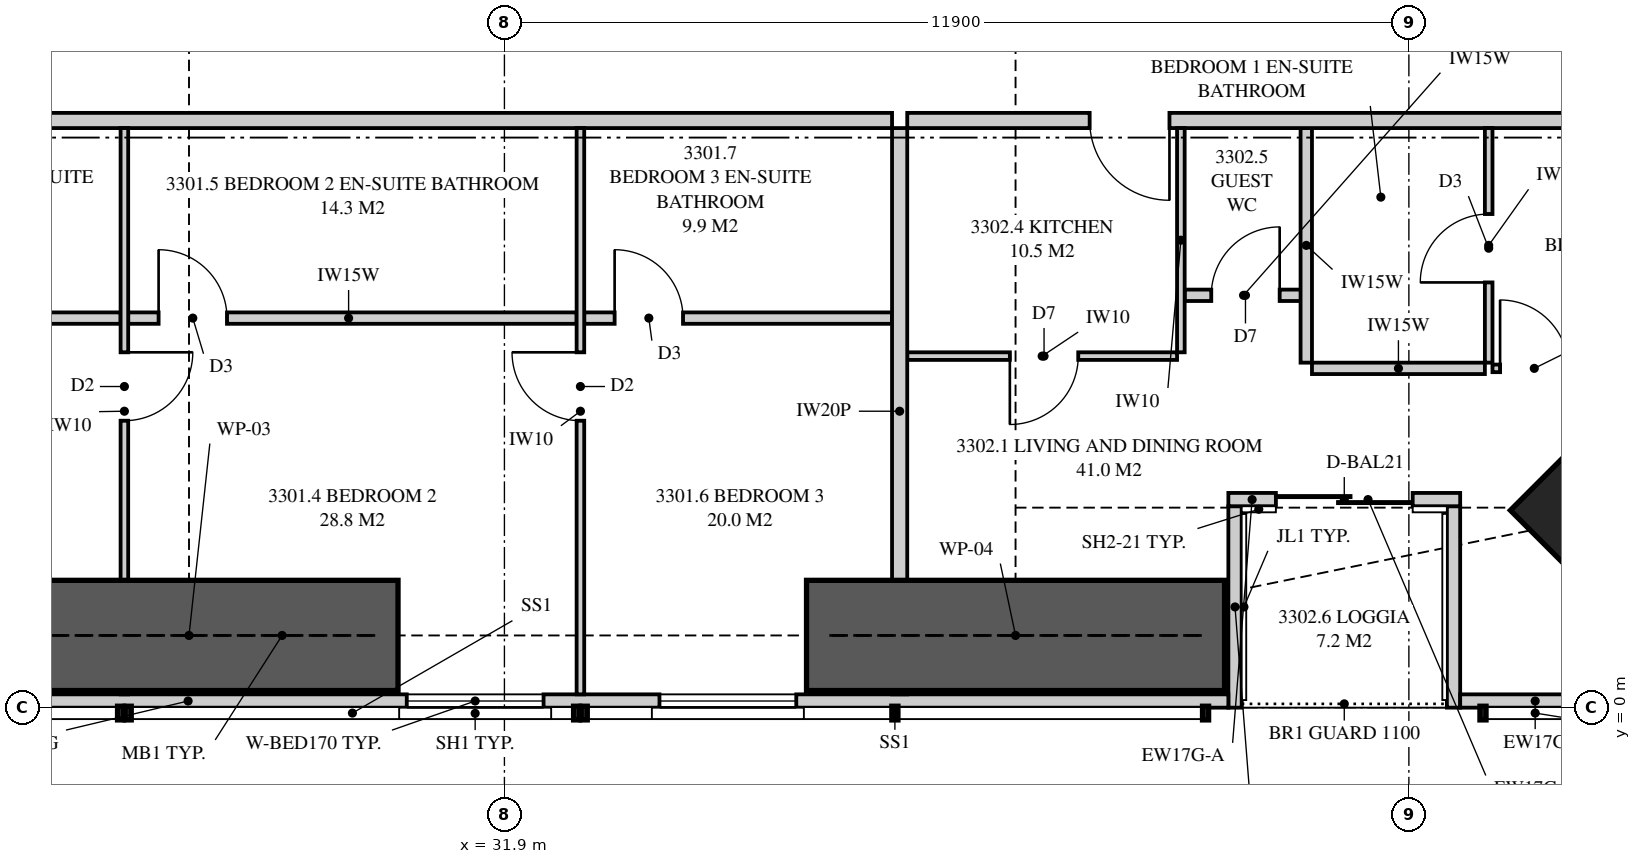
"""IFC4 building model, lengths in metres.
Left out: names, types, materials, properties, quantities, classifications, styles, units other than length and angle.
Written with IfcOpenShell. Run it as: python <this file> out.ifc"""

import sys

from ifc_helpers import new_model, si_unit, direction, frame, frame_2d, origin, origin_2d, place, context, subcontext, project, spatial, polyline, rectangle, outline, extrude, element, fill, save


model = new_model("IFC4")
c1 = context("Model", 3, precision=1e-05, world=origin(), true_north=direction((0.0, 1.0)))
c2 = subcontext(c1, "Body", "Model", "MODEL_VIEW")
j1 = project(units=[si_unit("LENGTHUNIT", "METRE"), si_unit("PLANEANGLEUNIT", "RADIAN")], contexts=[c1])
p1 = place(None, origin())
s1 = spatial("IfcSite", under=j1, at=p1, CompositionType="ELEMENT")
p2 = place(p1, origin())
s2 = spatial("IfcBuilding", under=s1, at=p2, CompositionType="ELEMENT")
p3 = place(p2, frame((0.0, 0.0, 121.6)))
s3 = spatial("IfcBuildingStorey", under=s2, at=p3, CompositionType="ELEMENT", Elevation=121.6)
p4 = place(p3, frame((46.869, 2.631, 0.0), z_axis=(0.0, 0.0, 1.0), x_axis=(-0.707106781187, 0.707106781187, 0.0)))
e1 = element("IfcColumn", 1, at=p4, inside=s3, PredefinedType="COLUMN", context=c2, shape_type="SweptSolid", body=[
    extrude(rectangle(XDim=2.4, YDim=2.5, at=origin_2d()), origin(), (0.0, 0.0, 1.0), 3.35),
])
p5 = place(p3, frame((14.051, 0.087, 0.0), z_axis=(0.0, 0.0, 1.0), x_axis=(1.0, 0.0, 0.0)))
e2 = element("IfcWall", 2, at=p5, inside=s3, PredefinedType="SOLIDWALL", context=c2, shape_type="SweptSolid", body=[
    extrude(outline(polyline([(0.0, 0.0), (27.374, 0.0), (27.374, 3.11), (24.777, 3.11), (24.777, 2.15), (24.732, 2.15), (24.732, 3.11), (24.574, 3.11), (24.574, 2.15), (2.824, 2.15), (2.824, 3.11), (2.666, 3.11), (2.666, 2.15), (2.62, 2.15), (2.62, 3.11), (0.0, 3.11), (0.0, 0.0)])), frame((0.0, 0.087, 0.0), z_axis=(0.0, -1.0, 0.0), x_axis=(1.0, 0.0, 0.0)), (0.0, 0.0, 1.0), 0.175),
])
p6 = place(p5, frame((5.874, 0.0, 0.4)))
e3 = element("IfcOpeningElement", 3, at=p6, cuts=e2, PredefinedType="OPENING", context=c2, shape_type="SweptSolid", body=[
    extrude(rectangle(XDim=1.8, YDim=1.7, at=frame_2d((0.9, 0.85))), frame((0.0, 0.097, 0.0), z_axis=(0.0, -1.0, 0.0), x_axis=(1.0, 0.0, 0.0)), (0.0, 0.0, 1.0), 0.195),
])
p7 = place(p5, frame((9.04, 0.0, 0.4)))
e4 = element("IfcOpeningElement", 4, at=p7, cuts=e2, PredefinedType="OPENING", context=c2, shape_type="SweptSolid", body=[
    extrude(rectangle(XDim=1.8, YDim=1.7, at=frame_2d((0.9, 0.85))), frame((0.0, 0.097, 0.0), z_axis=(0.0, -1.0, 0.0), x_axis=(1.0, 0.0, 0.0)), (0.0, 0.0, 1.0), 0.195),
])
p8 = place(p5, frame((16.564, 0.0, 0.4)))
e5 = element("IfcOpeningElement", 5, at=p8, cuts=e2, PredefinedType="OPENING", context=c2, shape_type="SweptSolid", body=[
    extrude(rectangle(XDim=1.8, YDim=1.7, at=frame_2d((0.9, 0.85))), frame((0.0, 0.097, 0.0), z_axis=(0.0, -1.0, 0.0), x_axis=(1.0, 0.0, 0.0)), (0.0, 0.0, 1.0), 0.195),
])
p9 = place(p5, frame((19.889, 0.0, 0.4)))
e6 = element("IfcOpeningElement", 6, at=p9, cuts=e2, PredefinedType="OPENING", context=c2, shape_type="SweptSolid", body=[
    extrude(rectangle(XDim=1.8, YDim=1.7, at=frame_2d((0.9, 0.85))), frame((0.0, 0.097, 0.0), z_axis=(0.0, -1.0, 0.0), x_axis=(1.0, 0.0, 0.0)), (0.0, 0.0, 1.0), 0.195),
])
p10 = place(p3, frame((44.475, 0.087, 0.0), z_axis=(0.0, 0.0, 1.0), x_axis=(1.0, 0.0, 0.0)))
e7 = element("IfcWall", 7, at=p10, inside=s3, PredefinedType="SOLIDWALL", context=c2, shape_type="SweptSolid", body=[
    extrude(rectangle(XDim=1.974, YDim=0.175, at=frame_2d((0.987, 0.0))), origin(), (0.0, 0.0, 1.0), 3.11),
])
p11 = place(p3, frame((41.425, 2.738, 0.0), z_axis=(0.0, 0.0, 1.0), x_axis=(1.0, 0.0, 0.0)))
e8 = element("IfcWall", 8, at=p11, inside=s3, PredefinedType="SOLIDWALL", context=c2, shape_type="SweptSolid", body=[
    extrude(rectangle(XDim=0.625, YDim=0.175, at=frame_2d((0.312, 0.0))), origin(), (0.0, 0.0, 1.0), 2.51),
])
p12 = place(p3, frame((42.05, 2.738, 0.0), z_axis=(0.0, 0.0, 1.0), x_axis=(1.0, 0.0, 0.0)))
e9 = element("IfcWall", 9, at=p12, inside=s3, PredefinedType="SOLIDWALL", context=c2, shape_type="SweptSolid", body=[
    extrude(rectangle(XDim=2.425, YDim=0.175, at=frame_2d((1.212, 0.0))), origin(), (0.0, 0.0, 1.0), 2.15),
])
p13 = place(p12, origin())
e10 = element("IfcOpeningElement", 10, at=p13, cuts=e9, PredefinedType="OPENING", context=c2, shape_type="SweptSolid", body=[
    extrude(rectangle(XDim=1.8, YDim=2.1, at=frame_2d((0.9, 1.05))), frame((0.0, 0.097, 0.0), z_axis=(0.0, -1.0, 0.0), x_axis=(1.0, 0.0, 0.0)), (0.0, 0.0, 1.0), 0.195),
])
p14 = place(p3, frame((41.512, 0.0, 0.0), z_axis=(0.0, 0.0, 1.0), x_axis=(0.0, 1.0, 0.0)))
e11 = element("IfcWall", 11, at=p14, inside=s3, PredefinedType="SOLIDWALL", context=c2, shape_type="SweptSolid", body=[
    extrude(outline(polyline([(0.0, 0.0), (2.65, 0.0), (2.65, 2.51), (2.373, 2.51), (2.373, 2.15), (0.705, 2.15), (0.705, 3.11), (0.0, 3.11), (0.0, 0.0)])), frame((0.0, 0.087, 0.0), z_axis=(0.0, -1.0, 0.0), x_axis=(1.0, 0.0, 0.0)), (0.0, 0.0, 1.0), 0.175),
])
p15 = place(p3, frame((44.387, 0.0, 0.0), z_axis=(0.0, 0.0, 1.0), x_axis=(0.0, 1.0, 0.0)))
e12 = element("IfcWall", 12, at=p15, inside=s3, PredefinedType="SOLIDWALL", context=c2, shape_type="SweptSolid", body=[
    extrude(outline(polyline([(0.0, 0.0), (2.65, 0.0), (2.65, 2.15), (1.291, 2.15), (1.291, 3.11), (0.0, 3.11), (0.0, 0.0)])), frame((0.0, 0.087, 0.0), z_axis=(0.0, -1.0, 0.0), x_axis=(1.0, 0.0, 0.0)), (0.0, 0.0, 1.0), 0.175),
])
p16 = place(p3, frame((37.1, 0.175, 0.0), z_axis=(0.0, 0.0, 1.0), x_axis=(0.0, 1.0, 0.0)))
e13 = element("IfcWall", 13, at=p16, inside=s3, PredefinedType="PARTITIONING", context=c2, shape_type="SweptSolid", body=[
    extrude(outline(polyline([(0.529, 2.15), (0.0, 2.15), (0.0, 0.0), (0.529, 0.0), (0.529, 0.461), (1.021, 0.461), (1.021, 0.0), (7.45, 0.0), (7.45, 3.11), (1.685, 3.11), (1.685, 2.15), (1.021, 2.15), (1.021, 1.688), (0.529, 1.688), (0.529, 2.15)])), frame((0.0, 0.1, 0.0), z_axis=(0.0, -1.0, 0.0), x_axis=(1.0, 0.0, 0.0)), (0.0, 0.0, 1.0), 0.2),
])
p17 = place(p3, frame((17.775, 7.725, 0.0), z_axis=(0.0, 0.0, 1.0), x_axis=(1.0, 0.0, 0.0)))
e14 = element("IfcWall", 14, at=p17, inside=s3, PredefinedType="PARTITIONING", context=c2, shape_type="SweptSolid", body=[
    extrude(outline(polyline([(0.0, 0.0), (19.225, 0.0), (19.225, 3.11), (10.312, 3.11), (10.312, 2.541), (9.638, 2.541), (9.638, 3.11), (0.0, 3.11), (0.0, 0.0)])), frame((0.0, 0.1, 0.0), z_axis=(0.0, -1.0, 0.0), x_axis=(1.0, 0.0, 0.0)), (0.0, 0.0, 1.0), 0.2),
])
p18 = place(p17, frame((3.275, 0.0, 0.0)))
e15 = element("IfcOpeningElement", 15, at=p18, cuts=e14, PredefinedType="OPENING", context=c2, shape_type="SweptSolid", body=[
    extrude(rectangle(XDim=1.05, YDim=2.2, at=frame_2d((0.525, 1.1))), frame((0.0, 0.11, 0.0), z_axis=(0.0, -1.0, 0.0), x_axis=(1.0, 0.0, 0.0)), (0.0, 0.0, 1.0), 0.22),
])
p19 = place(p3, frame((26.9, 0.175, 0.0), z_axis=(0.0, 0.0, 1.0), x_axis=(0.0, 1.0, 0.0)))
e16 = element("IfcWall", 16, at=p19, inside=s3, PredefinedType="PARTITIONING", context=c2, shape_type="SweptSolid", body=[
    extrude(outline(polyline([(0.529, 2.15), (0.0, 2.15), (0.0, 0.0), (0.529, 0.0), (0.529, 0.889), (1.021, 0.889), (1.021, 0.0), (7.45, 0.0), (7.45, 3.11), (1.635, 3.11), (1.635, 2.15), (1.021, 2.15), (1.021, 1.261), (0.529, 1.261), (0.529, 2.15)])), frame((0.0, 0.05, 0.0), z_axis=(0.0, -1.0, 0.0), x_axis=(1.0, 0.0, 0.0)), (0.0, 0.0, 1.0), 0.1),
])
p20 = place(p19, frame((3.6, 0.0, 0.0)))
e17 = element("IfcOpeningElement", 17, at=p20, cuts=e16, PredefinedType="OPENING", context=c2, shape_type="SweptSolid", body=[
    extrude(rectangle(XDim=0.9, YDim=2.1, at=frame_2d((0.45, 1.05))), frame((0.0, 0.06, 0.0), z_axis=(0.0, -1.0, 0.0), x_axis=(1.0, 0.0, 0.0)), (0.0, 0.0, 1.0), 0.12),
])
p21 = place(p3, frame((32.9, 0.175, 0.0), z_axis=(0.0, 0.0, 1.0), x_axis=(0.0, 1.0, 0.0)))
e18 = element("IfcWall", 18, at=p21, inside=s3, PredefinedType="PARTITIONING", context=c2, shape_type="SweptSolid", body=[
    extrude(outline(polyline([(0.0, 0.0), (7.45, 0.0), (7.45, 3.11), (1.635, 3.11), (1.635, 2.15), (0.0, 2.15), (0.0, 3.11), (0.0, 0.0)])), frame((0.0, 0.05, 0.0), z_axis=(0.0, -1.0, 0.0), x_axis=(1.0, 0.0, 0.0)), (0.0, 0.0, 1.0), 0.1),
])
p22 = place(p21, frame((3.6, 0.0, 0.0)))
e19 = element("IfcOpeningElement", 19, at=p22, cuts=e18, PredefinedType="OPENING", context=c2, shape_type="SweptSolid", body=[
    extrude(rectangle(XDim=0.9, YDim=2.1, at=frame_2d((0.45, 1.05))), frame((0.0, 0.06, 0.0), z_axis=(0.0, -1.0, 0.0), x_axis=(1.0, 0.0, 0.0)), (0.0, 0.0, 1.0), 0.12),
])
p23 = place(p3, frame((22.7, 5.125, 0.0), z_axis=(0.0, 0.0, 1.0), x_axis=(1.0, 0.0, 0.0)))
e20 = element("IfcWall", 20, at=p23, inside=s3, PredefinedType="PLUMBINGWALL", context=c2, shape_type="SweptSolid", body=[
    extrude(rectangle(XDim=4.15, YDim=0.15, at=frame_2d((2.075, 0.0))), origin(), (0.0, 0.0, 1.0), 3.11),
])
p24 = place(p23, frame((0.4, 0.0, 0.0)))
e21 = element("IfcOpeningElement", 21, at=p24, cuts=e20, PredefinedType="OPENING", context=c2, shape_type="SweptSolid", body=[
    extrude(rectangle(XDim=0.9, YDim=2.1, at=frame_2d((0.45, 1.05))), frame((0.0, 0.085, 0.0), z_axis=(0.0, -1.0, 0.0), x_axis=(1.0, 0.0, 0.0)), (0.0, 0.0, 1.0), 0.17),
])
p25 = place(p3, frame((26.95, 5.125, 0.0), z_axis=(0.0, 0.0, 1.0), x_axis=(1.0, 0.0, 0.0)))
e22 = element("IfcWall", 22, at=p25, inside=s3, PredefinedType="PLUMBINGWALL", context=c2, shape_type="SweptSolid", body=[
    extrude(outline(polyline([(0.0, 0.0), (5.9, 0.0), (5.9, 3.11), (1.112, 3.11), (1.112, 2.541), (0.488, 2.541), (0.488, 3.11), (0.0, 3.11), (0.0, 0.0)])), frame((0.0, 0.075, 0.0), z_axis=(0.0, -1.0, 0.0), x_axis=(1.0, 0.0, 0.0)), (0.0, 0.0, 1.0), 0.15),
])
p26 = place(p25, frame((0.4, 0.0, 0.0)))
e23 = element("IfcOpeningElement", 23, at=p26, cuts=e22, PredefinedType="OPENING", context=c2, shape_type="SweptSolid", body=[
    extrude(rectangle(XDim=0.9, YDim=2.1, at=frame_2d((0.45, 1.05))), frame((0.0, 0.085, 0.0), z_axis=(0.0, -1.0, 0.0), x_axis=(1.0, 0.0, 0.0)), (0.0, 0.0, 1.0), 0.17),
])
p27 = place(p3, frame((32.95, 5.125, 0.0), z_axis=(0.0, 0.0, 1.0), x_axis=(1.0, 0.0, 0.0)))
e24 = element("IfcWall", 24, at=p27, inside=s3, PredefinedType="PLUMBINGWALL", context=c2, shape_type="SweptSolid", body=[
    extrude(rectangle(XDim=4.05, YDim=0.15, at=frame_2d((2.025, 0.0))), origin(), (0.0, 0.0, 1.0), 3.11),
])
p28 = place(p27, frame((0.4, 0.0, 0.0)))
e25 = element("IfcOpeningElement", 25, at=p28, cuts=e24, PredefinedType="OPENING", context=c2, shape_type="SweptSolid", body=[
    extrude(rectangle(XDim=0.9, YDim=2.1, at=frame_2d((0.45, 1.05))), frame((0.0, 0.085, 0.0), z_axis=(0.0, -1.0, 0.0), x_axis=(1.0, 0.0, 0.0)), (0.0, 0.0, 1.0), 0.17),
])
p29 = place(p3, frame((37.2, 7.725, 0.0), z_axis=(0.0, 0.0, 1.0), x_axis=(1.0, 0.0, 0.0)))
e26 = element("IfcWall", 26, at=p29, inside=s3, PredefinedType="PARTITIONING", context=c2, shape_type="SweptSolid", body=[
    extrude(outline(polyline([(0.0, 0.0), (8.825, 0.0), (8.825, 3.11), (1.762, 3.11), (1.762, 2.541), (1.088, 2.541), (1.088, 3.11), (0.0, 3.11), (0.0, 0.0)])), frame((0.0, 0.1, 0.0), z_axis=(0.0, -1.0, 0.0), x_axis=(1.0, 0.0, 0.0)), (0.0, 0.0, 1.0), 0.2),
])
p30 = place(p29, frame((2.4, 0.0, 0.0)))
e27 = element("IfcOpeningElement", 27, at=p30, cuts=e26, PredefinedType="OPENING", context=c2, shape_type="SweptSolid", body=[
    extrude(rectangle(XDim=1.05, YDim=2.2, at=frame_2d((0.525, 1.1))), frame((0.0, 0.11, 0.0), z_axis=(0.0, -1.0, 0.0), x_axis=(1.0, 0.0, 0.0)), (0.0, 0.0, 1.0), 0.22),
])
p31 = place(p3, frame((44.85, 4.539, 0.0), z_axis=(0.0, 0.0, 1.0), x_axis=(0.0, 1.0, 0.0)))
e28 = element("IfcWall", 28, at=p31, inside=s3, PredefinedType="PARTITIONING", context=c2, shape_type="SweptSolid", body=[
    extrude(rectangle(XDim=3.086, YDim=0.1, at=frame_2d((1.543, 0.0))), origin(), (0.0, 0.0, 1.0), 3.11),
])
p32 = place(p31, frame((1.056, 0.0, 0.0)))
e29 = element("IfcOpeningElement", 29, at=p32, cuts=e28, PredefinedType="OPENING", context=c2, shape_type="SweptSolid", body=[
    extrude(rectangle(XDim=0.9, YDim=2.1, at=frame_2d((0.45, 1.05))), frame((0.0, 0.06, 0.0), z_axis=(0.0, -1.0, 0.0), x_axis=(1.0, 0.0, 0.0)), (0.0, 0.0, 1.0), 0.12),
])
p33 = place(p3, frame((44.9, 4.464, 0.0), z_axis=(0.0, 0.0, 1.0), x_axis=(1.0, 0.0, 0.0)))
e30 = element("IfcWall", 30, at=p33, inside=s3, PredefinedType="PARTITIONING", context=c2, shape_type="SweptSolid", body=[
    extrude(outline(polyline([(0.0, 0.0), (4.6, 0.0), (4.6, 3.11), (3.137, 3.11), (3.137, 2.15), (1.395, 2.15), (1.395, 3.11), (0.0, 3.11), (0.0, 0.0)])), frame((0.0, 0.05, 0.0), z_axis=(0.0, -1.0, 0.0), x_axis=(1.0, 0.0, 0.0)), (0.0, 0.0, 1.0), 0.1),
])
p34 = place(p33, frame((0.1, 0.0, 0.0)))
e31 = element("IfcOpeningElement", 31, at=p34, cuts=e30, PredefinedType="OPENING", context=c2, shape_type="SweptSolid", body=[
    extrude(rectangle(XDim=0.9, YDim=2.1, at=frame_2d((0.45, 1.05))), frame((0.0, 0.06, 0.0), z_axis=(0.0, -1.0, 0.0), x_axis=(1.0, 0.0, 0.0)), (0.0, 0.0, 1.0), 0.12),
])
p35 = place(p3, frame((42.525, 4.464, 0.0), z_axis=(0.0, 0.0, 1.0), x_axis=(1.0, 0.0, 0.0)))
e32 = element("IfcWall", 32, at=p35, inside=s3, PredefinedType="PLUMBINGWALL", context=c2, shape_type="SweptSolid", body=[
    extrude(rectangle(XDim=2.275, YDim=0.15, at=frame_2d((1.138, 0.0))), origin(), (0.0, 0.0, 1.0), 3.11),
])
p36 = place(p3, frame((42.45, 4.539, 0.0), z_axis=(0.0, 0.0, 1.0), x_axis=(0.0, 1.0, 0.0)))
e33 = element("IfcWall", 33, at=p36, inside=s3, PredefinedType="PLUMBINGWALL", context=c2, shape_type="SweptSolid", body=[
    extrude(rectangle(XDim=3.086, YDim=0.15, at=frame_2d((1.543, 0.0))), origin(), (0.0, 0.0, 1.0), 3.11),
])
p37 = place(p3, frame((37.2, 4.625, 0.0), z_axis=(0.0, 0.0, 1.0), x_axis=(1.0, 0.0, 0.0)))
e34 = element("IfcWall", 34, at=p37, inside=s3, PredefinedType="PARTITIONING", context=c2, shape_type="SweptSolid", body=[
    extrude(outline(polyline([(0.0, 0.0), (3.55, 0.0), (3.55, 3.11), (1.712, 3.11), (1.712, 2.541), (1.138, 2.541), (1.138, 3.11), (0.0, 3.11), (0.0, 0.0)])), frame((0.0, 0.05, 0.0), z_axis=(0.0, -1.0, 0.0), x_axis=(1.0, 0.0, 0.0)), (0.0, 0.0, 1.0), 0.1),
])
p38 = place(p37, frame((1.35, 0.0, 0.0)))
e35 = element("IfcOpeningElement", 35, at=p38, cuts=e34, PredefinedType="OPENING", context=c2, shape_type="SweptSolid", body=[
    extrude(rectangle(XDim=0.9, YDim=2.1, at=frame_2d((0.45, 1.05))), frame((0.0, 0.06, 0.0), z_axis=(0.0, -1.0, 0.0), x_axis=(1.0, 0.0, 0.0)), (0.0, 0.0, 1.0), 0.12),
])
p39 = place(p3, frame((40.8, 4.675, 0.0), z_axis=(0.0, 0.0, 1.0), x_axis=(0.0, 1.0, 0.0)))
e36 = element("IfcWall", 36, at=p39, inside=s3, PredefinedType="PARTITIONING", context=c2, shape_type="SweptSolid", body=[
    extrude(rectangle(XDim=2.95, YDim=0.1, at=frame_2d((1.475, 0.0))), origin(), (0.0, 0.0, 1.0), 3.11),
])
p40 = place(p3, frame((40.85, 5.425, 0.0), z_axis=(0.0, 0.0, 1.0), x_axis=(1.0, 0.0, 0.0)))
e37 = element("IfcWall", 37, at=p40, inside=s3, PredefinedType="PLUMBINGWALL", context=c2, shape_type="SweptSolid", body=[
    extrude(rectangle(XDim=1.55, YDim=0.15, at=frame_2d((0.775, 0.0))), origin(), (0.0, 0.0, 1.0), 3.11),
])
p41 = place(p40, frame((0.35, 0.0, 0.0)))
e38 = element("IfcOpeningElement", 38, at=p41, cuts=e37, PredefinedType="OPENING", context=c2, shape_type="SweptSolid", body=[
    extrude(rectangle(XDim=0.9, YDim=2.1, at=frame_2d((0.45, 1.05))), frame((0.0, 0.085, 0.0), z_axis=(0.0, -1.0, 0.0), x_axis=(1.0, 0.0, 0.0)), (0.0, 0.0, 1.0), 0.17),
])
for number, where, z_axis, x_axis in (
    (39, (25.0, 0.95, 0.0), (0.0, 0.0, 1.0), (1.0, 0.0, 0.0)),
    (40, (35.875, 0.95, 0.0), (0.0, 0.0, 1.0), (1.0, 0.0, 0.0)),
):
    element("IfcWall", number, at=place(p3, frame(where, z_axis=z_axis, x_axis=x_axis)), inside=s3, PredefinedType="SHEAR", context=c2, shape_type="SweptSolid", body=[
        extrude(rectangle(XDim=5.5, YDim=1.45, at=frame_2d((2.75, 0.0))), origin(), (0.0, 0.0, 1.0), 3.35),
    ])
p42 = place(p8, origin())
e41 = element("IfcWindow", 41, at=p42, inside=s3, PartitioningType="SINGLE_PANEL", PredefinedType="WINDOW", context=c2, shape_type="SweptSolid", body=[
    extrude(rectangle(XDim=1.8, YDim=1.7, at=frame_2d((0.9, 0.85))), frame((0.0, 0.03, 0.0), z_axis=(0.0, -1.0, 0.0), x_axis=(1.0, 0.0, 0.0)), (0.0, 0.0, 1.0), 0.06),
])
fill(e5, e41)
p43 = place(p9, origin())
e42 = element("IfcWindow", 42, at=p43, inside=s3, PartitioningType="SINGLE_PANEL", PredefinedType="WINDOW", context=c2, shape_type="SweptSolid", body=[
    extrude(rectangle(XDim=1.8, YDim=1.7, at=frame_2d((0.9, 0.85))), frame((0.0, 0.03, 0.0), z_axis=(0.0, -1.0, 0.0), x_axis=(1.0, 0.0, 0.0)), (0.0, 0.0, 1.0), 0.06),
])
fill(e6, e42)
p44 = place(p13, origin())
e43 = element("IfcDoor", 43, at=p44, inside=s3, OperationType="SLIDING_TO_LEFT", PredefinedType="DOOR", context=c2, shape_type="SweptSolid", body=[
    extrude(rectangle(XDim=1.8, YDim=2.1, at=frame_2d((0.9, 1.05))), frame((0.0, 0.025, 0.0), z_axis=(0.0, -1.0, 0.0), x_axis=(1.0, 0.0, 0.0)), (0.0, 0.0, 1.0), 0.05),
])
fill(e10, e43)
p45 = place(p20, frame((0.9, 0.0, 0.0), z_axis=(0.0, 0.0, 1.0), x_axis=(-1.0, 0.0, 0.0)))
e44 = element("IfcDoor", 44, at=p45, inside=s3, OperationType="SINGLE_SWING_LEFT", PredefinedType="DOOR", context=c2, shape_type="SweptSolid", body=[
    extrude(rectangle(XDim=0.9, YDim=2.1, at=frame_2d((0.45, 1.05))), frame((0.0, 0.025, 0.0), z_axis=(0.0, -1.0, 0.0), x_axis=(1.0, 0.0, 0.0)), (0.0, 0.0, 1.0), 0.05),
])
fill(e17, e44)
p46 = place(p26, origin())
e45 = element("IfcDoor", 45, at=p46, inside=s3, OperationType="SINGLE_SWING_LEFT", PredefinedType="DOOR", context=c2, shape_type="SweptSolid", body=[
    extrude(rectangle(XDim=0.9, YDim=2.1, at=frame_2d((0.45, 1.05))), frame((0.0, 0.025, 0.0), z_axis=(0.0, -1.0, 0.0), x_axis=(1.0, 0.0, 0.0)), (0.0, 0.0, 1.0), 0.05),
])
fill(e23, e45)
p47 = place(p22, origin())
e46 = element("IfcDoor", 46, at=p47, inside=s3, OperationType="SINGLE_SWING_RIGHT", PredefinedType="DOOR", context=c2, shape_type="SweptSolid", body=[
    extrude(rectangle(XDim=0.9, YDim=2.1, at=frame_2d((0.45, 1.05))), frame((0.0, 0.025, 0.0), z_axis=(0.0, -1.0, 0.0), x_axis=(1.0, 0.0, 0.0)), (0.0, 0.0, 1.0), 0.05),
])
fill(e19, e46)
p48 = place(p28, origin())
e47 = element("IfcDoor", 47, at=p48, inside=s3, OperationType="SINGLE_SWING_LEFT", PredefinedType="DOOR", context=c2, shape_type="SweptSolid", body=[
    extrude(rectangle(XDim=0.9, YDim=2.1, at=frame_2d((0.45, 1.05))), frame((0.0, 0.025, 0.0), z_axis=(0.0, -1.0, 0.0), x_axis=(1.0, 0.0, 0.0)), (0.0, 0.0, 1.0), 0.05),
])
fill(e25, e47)
p49 = place(p30, frame((1.05, 0.0, 0.0), z_axis=(0.0, 0.0, 1.0), x_axis=(-1.0, 0.0, 0.0)))
e48 = element("IfcDoor", 48, at=p49, inside=s3, OperationType="SINGLE_SWING_LEFT", PredefinedType="DOOR", context=c2, shape_type="SweptSolid", body=[
    extrude(rectangle(XDim=1.05, YDim=2.2, at=frame_2d((0.525, 1.1))), frame((0.0, 0.025, 0.0), z_axis=(0.0, -1.0, 0.0), x_axis=(1.0, 0.0, 0.0)), (0.0, 0.0, 1.0), 0.05),
])
fill(e27, e48)
p50 = place(p34, origin())
e49 = element("IfcDoor", 49, at=p50, inside=s3, OperationType="SINGLE_SWING_LEFT", PredefinedType="DOOR", context=c2, shape_type="SweptSolid", body=[
    extrude(rectangle(XDim=0.9, YDim=2.1, at=frame_2d((0.45, 1.05))), frame((0.0, 0.025, 0.0), z_axis=(0.0, -1.0, 0.0), x_axis=(1.0, 0.0, 0.0)), (0.0, 0.0, 1.0), 0.05),
])
fill(e31, e49)
p51 = place(p32, origin())
e50 = element("IfcDoor", 50, at=p51, inside=s3, OperationType="SINGLE_SWING_LEFT", PredefinedType="DOOR", context=c2, shape_type="SweptSolid", body=[
    extrude(rectangle(XDim=0.9, YDim=2.1, at=frame_2d((0.45, 1.05))), frame((0.0, 0.025, 0.0), z_axis=(0.0, -1.0, 0.0), x_axis=(1.0, 0.0, 0.0)), (0.0, 0.0, 1.0), 0.05),
])
fill(e29, e50)
p52 = place(p38, frame((0.9, 0.0, 0.0), z_axis=(0.0, 0.0, 1.0), x_axis=(-1.0, 0.0, 0.0)))
e51 = element("IfcDoor", 51, at=p52, inside=s3, OperationType="SINGLE_SWING_RIGHT", PredefinedType="DOOR", context=c2, shape_type="SweptSolid", body=[
    extrude(rectangle(XDim=0.9, YDim=2.1, at=frame_2d((0.45, 1.05))), frame((0.0, 0.025, 0.0), z_axis=(0.0, -1.0, 0.0), x_axis=(1.0, 0.0, 0.0)), (0.0, 0.0, 1.0), 0.05),
])
fill(e35, e51)
p53 = place(p41, origin())
e52 = element("IfcDoor", 52, at=p53, inside=s3, OperationType="SINGLE_SWING_RIGHT", PredefinedType="DOOR", context=c2, shape_type="SweptSolid", body=[
    extrude(rectangle(XDim=0.9, YDim=2.1, at=frame_2d((0.45, 1.05))), frame((0.0, 0.025, 0.0), z_axis=(0.0, -1.0, 0.0), x_axis=(1.0, 0.0, 0.0)), (0.0, 0.0, 1.0), 0.05),
])
fill(e38, e52)
save(model, sys.argv[1])
